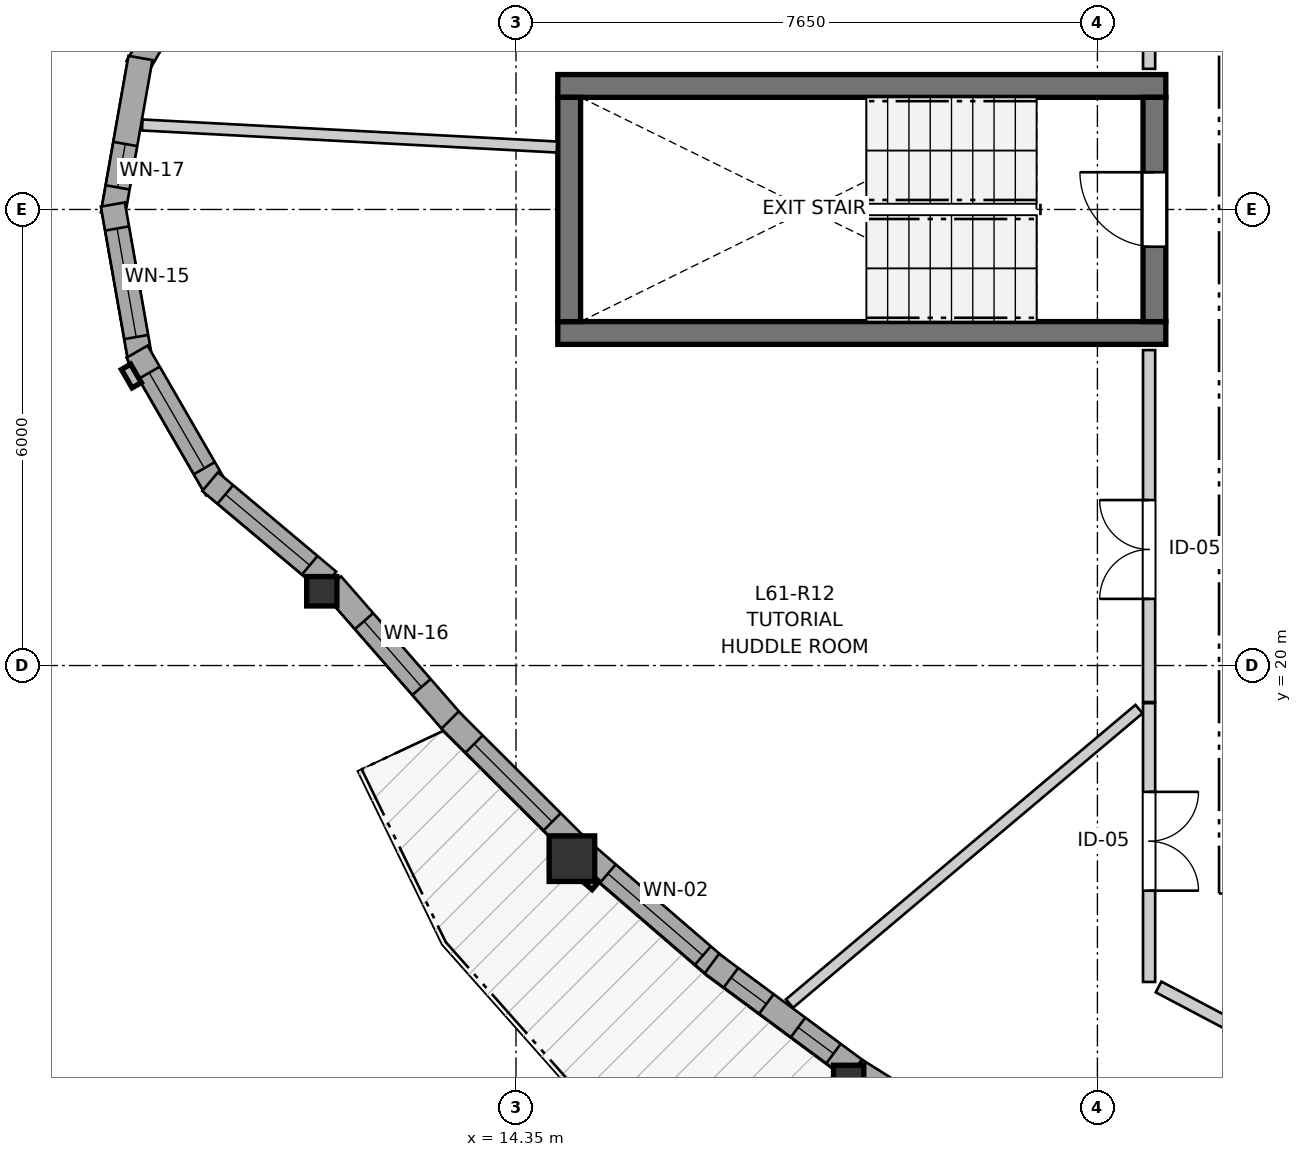
"""IFC4 building model, lengths in metres.
Left out: names, types, materials, properties, quantities, classifications, styles, units other than length and angle.
Written with IfcOpenShell. Run it as: python <this file> out.ifc"""

import sys

from ifc_helpers import new_model, si_unit, direction, frame, frame_2d, origin, origin_2d, place, context, subcontext, project, spatial, rectangle, i_section, extrude, source, transform, mapped, element, fill, save


model = new_model("IFC4")
c1 = context("Model", 3, precision=1e-05, world=origin(), true_north=direction((0.0, 1.0)))
c2 = subcontext(c1, "Body", "Model", "MODEL_VIEW")
j1 = project(units=[si_unit("LENGTHUNIT", "METRE"), si_unit("PLANEANGLEUNIT", "RADIAN")], contexts=[c1])
p1 = place(None, origin())
s1 = spatial("IfcSite", under=j1, at=p1, CompositionType="ELEMENT")
p2 = place(p1, origin())
s2 = spatial("IfcBuilding", under=s1, at=p2, CompositionType="ELEMENT")
p3 = place(p2, frame((0.0, 0.0, 205.2)))
s3 = spatial("IfcBuildingStorey", under=s2, at=p3, CompositionType="ELEMENT", Elevation=205.2)
for number, where, z_axis, x_axis in (
    (1, (14.9, 24.375, 0.0), (0.0, 0.0, 1.0), (1.0, 0.0, 0.0)),
    (2, (22.9, 27.625, 0.0), (0.0, 0.0, 1.0), (-1.0, 0.0, 0.0)),
):
    element("IfcWall", number, at=place(p3, frame(where, z_axis=z_axis, x_axis=x_axis)), inside=s3, PredefinedType="SHEAR", context=c2, shape_type="SweptSolid", body=[
        extrude(rectangle(XDim=8.0, YDim=0.3, at=frame_2d((4.0, 0.0))), origin(), (0.0, 0.0, 1.0), 2.935),
    ])
p4 = place(p3, frame((15.05, 27.475, 0.0), z_axis=(0.0, 0.0, 1.0), x_axis=(0.0, -1.0, 0.0)))
e3 = element("IfcWall", 3, at=p4, inside=s3, PredefinedType="SHEAR", context=c2, shape_type="SweptSolid", body=[
    extrude(rectangle(XDim=2.95, YDim=0.3, at=frame_2d((1.475, 0.0))), origin(), (0.0, 0.0, 1.0), 2.935),
])
p5 = place(p3, frame((22.75, 24.525, 0.0), z_axis=(0.0, 0.0, 1.0), x_axis=(0.0, 1.0, 0.0)))
e4 = element("IfcWall", 4, at=p5, inside=s3, PredefinedType="SHEAR", context=c2, shape_type="SweptSolid", body=[
    extrude(rectangle(XDim=2.95, YDim=0.3, at=frame_2d((1.475, 0.0))), origin(), (0.0, 0.0, 1.0), 2.935),
])
p6 = place(p5, frame((0.985, 0.0, 0.0)))
e5 = element("IfcOpeningElement", 5, at=p6, cuts=e4, PredefinedType="OPENING", context=c2, shape_type="SweptSolid", body=[
    extrude(rectangle(XDim=0.98, YDim=2.15, at=frame_2d((0.49, 1.075))), frame((0.0, 0.16, 0.0), z_axis=(0.0, -1.0, 0.0), x_axis=(1.0, 0.0, 0.0)), (0.0, 0.0, 1.0), 0.32),
])
m1 = source(origin(), c2, "Body", "SweptSolid", [
    extrude(i_section(OverallWidth=0.398, OverallDepth=0.387, WebThickness=0.019, FlangeThickness=0.03, FilletRadius=0.015, at=origin_2d()), origin(), (0.0, 0.0, 1.0), 2.935),
])
p7 = place(p3, frame((11.795, 20.977, 0.0), z_axis=(0.0, 0.0, 1.0), x_axis=(1.0, 0.0, 0.0)))
e6 = element("IfcColumn", 6, at=p7, inside=s3, PredefinedType="PILASTER", context=c2, shape_type="MappedRepresentation", body=[
    mapped(m1, transform((0.0, 0.0, 0.0), x_axis=(1.0, 0.0, 0.0), y_axis=(0.0, 1.0, 0.0), z_axis=(0.0, 0.0, 1.0), scale=1.0)),
])
m2 = source(origin(), c2, "Body", "SweptSolid", [
    extrude(rectangle(XDim=0.6, YDim=0.6, at=origin_2d()), origin(), (0.0, 0.0, 1.0), 2.935),
])
p8 = place(p3, frame((15.086, 17.459, 0.0), z_axis=(0.0, 0.0, 1.0), x_axis=(1.0, 0.0, 0.0)))
e7 = element("IfcColumn", 7, at=p8, inside=s3, PredefinedType="COLUMN", context=c2, shape_type="MappedRepresentation", body=[
    mapped(m2, transform((0.0, 0.0, 0.0), x_axis=(1.0, 0.0, 0.0), y_axis=(0.0, 1.0, 0.0), z_axis=(0.0, 0.0, 1.0), scale=1.0)),
])
p9 = place(p3, frame((18.727, 14.548, 0.0), z_axis=(0.0, 0.0, 1.0), x_axis=(1.0, 0.0, 0.0)))
e8 = element("IfcColumn", 8, at=p9, inside=s3, PredefinedType="PILASTER", context=c2, shape_type="MappedRepresentation", body=[
    mapped(m1, transform((0.0, 0.0, 0.0), x_axis=(1.0, 0.0, 0.0), y_axis=(0.0, 1.0, 0.0), z_axis=(0.0, 0.0, 1.0), scale=1.0)),
])
p10 = place(p3, frame((10.409, 29.681, 0.0), z_axis=(0.0, 0.0, 1.0), x_axis=(-0.49990781971, -0.866078617559, 0.0)))
e9 = element("IfcWall", 9, at=p10, inside=s3, PredefinedType="SOLIDWALL", context=c2, shape_type="SweptSolid", body=[
    extrude(rectangle(XDim=2.09, YDim=0.32, at=frame_2d((1.045, 0.0))), origin(), (0.0, 0.0, 1.0), 2.555),
])
p11 = place(p10, frame((0.42, 0.0, 0.82)))
e10 = element("IfcOpeningElement", 10, at=p11, cuts=e9, PredefinedType="OPENING", context=c2, shape_type="SweptSolid", body=[
    extrude(rectangle(XDim=1.25, YDim=1.35, at=frame_2d((0.625, 0.675))), frame((0.0, 0.17, 0.0), z_axis=(0.0, -1.0, 0.0), x_axis=(1.0, 0.0, 0.0)), (0.0, 0.0, 1.0), 0.34),
])
p12 = place(p3, frame((9.409, 27.993, 0.0), z_axis=(0.0, 0.0, 1.0), x_axis=(-0.173672066494, -0.984803540469, 0.0)))
e11 = element("IfcWall", 11, at=p12, inside=s3, PredefinedType="SOLIDWALL", context=c2, shape_type="SweptSolid", body=[
    extrude(rectangle(XDim=2.09, YDim=0.32, at=frame_2d((1.045, 0.0))), origin(), (0.0, 0.0, 1.0), 2.555),
])
p13 = place(p12, frame((1.149, 0.0, 0.82)))
e12 = element("IfcOpeningElement", 12, at=p13, cuts=e11, PredefinedType="OPENING", context=c2, shape_type="SweptSolid", body=[
    extrude(rectangle(XDim=0.58, YDim=1.35, at=frame_2d((0.29, 0.675))), frame((0.0, 0.17, 0.0), z_axis=(0.0, -1.0, 0.0), x_axis=(1.0, 0.0, 0.0)), (0.0, 0.0, 1.0), 0.34),
])
p14 = place(p3, frame((9.046, 26.065, 0.0), z_axis=(0.0, 0.0, 1.0), x_axis=(0.173672066494, -0.984803540469, 0.0)))
e13 = element("IfcWall", 13, at=p14, inside=s3, PredefinedType="SOLIDWALL", context=c2, shape_type="SweptSolid", body=[
    extrude(rectangle(XDim=2.09, YDim=0.32, at=frame_2d((1.045, 0.0))), origin(), (0.0, 0.0, 1.0), 2.555),
])
p15 = place(p14, frame((0.32, 0.0, 0.82)))
e14 = element("IfcOpeningElement", 14, at=p15, cuts=e13, PredefinedType="OPENING", context=c2, shape_type="SweptSolid", body=[
    extrude(rectangle(XDim=1.45, YDim=1.25, at=frame_2d((0.725, 0.625))), frame((0.0, 0.17, 0.0), z_axis=(0.0, -1.0, 0.0), x_axis=(1.0, 0.0, 0.0)), (0.0, 0.0, 1.0), 0.34),
])
p16 = place(p3, frame((9.365, 24.129, 0.0), z_axis=(0.0, 0.0, 1.0), x_axis=(0.49990781971, -0.866078617559, 0.0)))
e15 = element("IfcWall", 15, at=p16, inside=s3, PredefinedType="SOLIDWALL", context=c2, shape_type="SweptSolid", body=[
    extrude(rectangle(XDim=2.09, YDim=0.32, at=frame_2d((1.045, 0.0))), origin(), (0.0, 0.0, 1.0), 2.555),
])
p17 = place(p16, frame((0.32, 0.0, 0.82)))
e16 = element("IfcOpeningElement", 16, at=p17, cuts=e15, PredefinedType="OPENING", context=c2, shape_type="SweptSolid", body=[
    extrude(rectangle(XDim=1.45, YDim=1.25, at=frame_2d((0.725, 0.625))), frame((0.0, 0.17, 0.0), z_axis=(0.0, -1.0, 0.0), x_axis=(1.0, 0.0, 0.0)), (0.0, 0.0, 1.0), 0.34),
])
p18 = place(p3, frame((10.326, 22.419, 0.0), z_axis=(0.0, 0.0, 1.0), x_axis=(0.766099948115, -0.642721455608, 0.0)))
e17 = element("IfcWall", 17, at=p18, inside=s3, PredefinedType="SOLIDWALL", context=c2, shape_type="SweptSolid", body=[
    extrude(rectangle(XDim=2.032, YDim=0.32, at=frame_2d((1.016, 0.0))), origin(), (0.0, 0.0, 1.0), 2.555),
])
p19 = place(p18, frame((0.261, 0.0, 0.82)))
e18 = element("IfcOpeningElement", 18, at=p19, cuts=e17, PredefinedType="OPENING", context=c2, shape_type="SweptSolid", body=[
    extrude(rectangle(XDim=1.45, YDim=1.25, at=frame_2d((0.725, 0.625))), frame((0.0, 0.17, 0.0), z_axis=(0.0, -1.0, 0.0), x_axis=(1.0, 0.0, 0.0)), (0.0, 0.0, 1.0), 0.34),
])
p20 = place(p3, frame((11.929, 21.067, 0.0), z_axis=(0.0, 0.0, 1.0), x_axis=(0.657623588515, -0.753346677054, 0.0)))
e19 = element("IfcWall", 19, at=p20, inside=s3, PredefinedType="SOLIDWALL", context=c2, shape_type="SweptSolid", body=[
    extrude(rectangle(XDim=2.454, YDim=0.32, at=frame_2d((1.227, 0.0))), origin(), (0.0, 0.0, 1.0), 2.555),
])
p21 = place(p20, frame((0.642, 0.0, 0.82)))
e20 = element("IfcOpeningElement", 20, at=p21, cuts=e19, PredefinedType="OPENING", context=c2, shape_type="SweptSolid", body=[
    extrude(rectangle(XDim=1.15, YDim=1.2, at=frame_2d((0.575, 0.6))), frame((0.0, 0.17, 0.0), z_axis=(0.0, -1.0, 0.0), x_axis=(1.0, 0.0, 0.0)), (0.0, 0.0, 1.0), 0.34),
])
p22 = place(p3, frame((13.483, 19.282, 0.0), z_axis=(0.0, 0.0, 1.0), x_axis=(0.7083616261, -0.70584970544, 0.0)))
e21 = element("IfcWall", 21, at=p22, inside=s3, PredefinedType="SOLIDWALL", context=c2, shape_type="SweptSolid", body=[
    extrude(rectangle(XDim=2.333, YDim=0.32, at=frame_2d((1.166, 0.0))), origin(), (0.0, 0.0, 1.0), 2.555),
])
p23 = place(p22, frame((0.446, 0.0, 0.82)))
e22 = element("IfcOpeningElement", 22, at=p23, cuts=e21, PredefinedType="OPENING", context=c2, shape_type="SweptSolid", body=[
    extrude(rectangle(XDim=1.45, YDim=1.25, at=frame_2d((0.725, 0.625))), frame((0.0, 0.17, 0.0), z_axis=(0.0, -1.0, 0.0), x_axis=(1.0, 0.0, 0.0)), (0.0, 0.0, 1.0), 0.34),
])
p24 = place(p3, frame((15.259, 17.521, 0.0), z_axis=(0.0, 0.0, 1.0), x_axis=(0.757533377792, -0.652796431923, 0.0)))
e23 = element("IfcWall", 23, at=p24, inside=s3, PredefinedType="SOLIDWALL", context=c2, shape_type="SweptSolid", body=[
    extrude(rectangle(XDim=2.294, YDim=0.32, at=frame_2d((1.147, 0.0))), origin(), (0.0, 0.0, 1.0), 2.555),
])
p25 = place(p24, frame((0.397, 0.0, 0.82)))
e24 = element("IfcOpeningElement", 24, at=p25, cuts=e23, PredefinedType="OPENING", context=c2, shape_type="SweptSolid", body=[
    extrude(rectangle(XDim=1.65, YDim=1.45, at=frame_2d((0.825, 0.725))), frame((0.0, 0.17, 0.0), z_axis=(0.0, -1.0, 0.0), x_axis=(1.0, 0.0, 0.0)), (0.0, 0.0, 1.0), 0.34),
])
p26 = place(p3, frame((16.927, 16.079, 0.0), z_axis=(0.0, 0.0, 1.0), x_axis=(0.803843896942, -0.594840305754, 0.0)))
e25 = element("IfcWall", 25, at=p26, inside=s3, PredefinedType="SOLIDWALL", context=c2, shape_type="SweptSolid", body=[
    extrude(rectangle(XDim=2.337, YDim=0.32, at=frame_2d((1.169, 0.0))), origin(), (0.0, 0.0, 1.0), 2.555),
])
p27 = place(p26, frame((0.312, 0.0, 0.82)))
e26 = element("IfcOpeningElement", 26, at=p27, cuts=e25, PredefinedType="OPENING", context=c2, shape_type="SweptSolid", body=[
    extrude(rectangle(XDim=0.58, YDim=1.35, at=frame_2d((0.29, 0.675))), frame((0.0, 0.17, 0.0), z_axis=(0.0, -1.0, 0.0), x_axis=(1.0, 0.0, 0.0)), (0.0, 0.0, 1.0), 0.34),
])
p28 = place(p26, frame((1.411, 0.0, 0.82)))
e27 = element("IfcOpeningElement", 27, at=p28, cuts=e25, PredefinedType="OPENING", context=c2, shape_type="SweptSolid", body=[
    extrude(rectangle(XDim=0.58, YDim=1.35, at=frame_2d((0.29, 0.675))), frame((0.0, 0.17, 0.0), z_axis=(0.0, -1.0, 0.0), x_axis=(1.0, 0.0, 0.0)), (0.0, 0.0, 1.0), 0.34),
])
p29 = place(p3, frame((18.829, 14.673, 0.0), z_axis=(0.0, 0.0, 1.0), x_axis=(0.846418748285, -0.53251788942, 0.0)))
e28 = element("IfcWall", 28, at=p29, inside=s3, PredefinedType="SOLIDWALL", context=c2, shape_type="SweptSolid", body=[
    extrude(rectangle(XDim=2.324, YDim=0.32, at=frame_2d((1.162, 0.0))), origin(), (0.0, 0.0, 1.0), 2.555),
])
p30 = place(p29, frame((0.477, 0.0, 0.82)))
e29 = element("IfcOpeningElement", 29, at=p30, cuts=e28, PredefinedType="OPENING", context=c2, shape_type="SweptSolid", body=[
    extrude(rectangle(XDim=1.35, YDim=1.45, at=frame_2d((0.675, 0.725))), frame((0.0, 0.17, 0.0), z_axis=(0.0, -1.0, 0.0), x_axis=(1.0, 0.0, 0.0)), (0.0, 0.0, 1.0), 0.34),
])
p31 = place(p3, frame((22.68, 19.52, 0.0), z_axis=(0.0, 0.0, 1.0), x_axis=(0.0, 1.0, 0.0)))
e30 = element("IfcWall", 30, at=p31, inside=s3, PredefinedType="PARTITIONING", context=c2, shape_type="SweptSolid", body=[
    extrude(rectangle(XDim=4.63, YDim=0.16, at=frame_2d((2.315, 0.0))), origin(), (0.0, 0.0, 1.0), 2.935),
])
p32 = place(p31, frame((1.357, 0.0, 0.0)))
e31 = element("IfcOpeningElement", 31, at=p32, cuts=e30, PredefinedType="OPENING", context=c2, shape_type="SweptSolid", body=[
    extrude(rectangle(XDim=1.3, YDim=2.1, at=frame_2d((0.65, 1.05))), frame((0.0, 0.09, 0.0), z_axis=(0.0, -1.0, 0.0), x_axis=(1.0, 0.0, 0.0)), (0.0, 0.0, 1.0), 0.18),
])
p33 = place(p3, frame((22.68, 19.505, 0.0), z_axis=(0.0, 0.0, 1.0), x_axis=(0.0, -1.0, 0.0)))
e32 = element("IfcWall", 32, at=p33, inside=s3, PredefinedType="PARTITIONING", context=c2, shape_type="SweptSolid", body=[
    extrude(rectangle(XDim=3.668, YDim=0.16, at=frame_2d((1.834, 0.0))), origin(), (0.0, 0.0, 1.0), 2.935),
])
p34 = place(p33, frame((1.167, 0.0, 0.0)))
e33 = element("IfcOpeningElement", 33, at=p34, cuts=e32, PredefinedType="OPENING", context=c2, shape_type="SweptSolid", body=[
    extrude(rectangle(XDim=1.3, YDim=2.1, at=frame_2d((0.65, 1.05))), frame((0.0, 0.09, 0.0), z_axis=(0.0, -1.0, 0.0), x_axis=(1.0, 0.0, 0.0)), (0.0, 0.0, 1.0), 0.18),
])
p35 = place(p3, frame((22.68, 27.85, 0.0), z_axis=(0.0, 0.0, 1.0), x_axis=(0.0, 1.0, 0.0)))
e34 = element("IfcWall", 34, at=p35, inside=s3, PredefinedType="PARTITIONING", context=c2, shape_type="SweptSolid", body=[
    extrude(rectangle(XDim=1.929, YDim=0.16, at=frame_2d((0.964, 0.0))), origin(), (0.0, 0.0, 1.0), 2.935),
])
p36 = place(p35, frame((0.53, 0.0, 0.0)))
e35 = element("IfcOpeningElement", 35, at=p36, cuts=e34, PredefinedType="OPENING", context=c2, shape_type="SweptSolid", body=[
    extrude(rectangle(XDim=0.96, YDim=2.1, at=frame_2d((0.48, 1.05))), frame((0.0, 0.09, 0.0), z_axis=(0.0, -1.0, 0.0), x_axis=(1.0, 0.0, 0.0)), (0.0, 0.0, 1.0), 0.18),
])
p37 = place(p3, frame((17.948, 15.553, 0.0), z_axis=(0.0, 0.0, 1.0), x_axis=(0.764805901006, 0.644260765364, 0.0)))
e36 = element("IfcWall", 36, at=p37, inside=s3, PredefinedType="PARTITIONING", context=c2, shape_type="SweptSolid", body=[
    extrude(rectangle(XDim=6.013, YDim=0.145, at=frame_2d((3.007, 0.0))), origin(), (0.0, 0.0, 1.0), 2.935),
])
p38 = place(p3, frame((9.433, 27.112, 0.0), z_axis=(0.0, 0.0, 1.0), x_axis=(0.998589537807, -0.053093643525, 0.0)))
e37 = element("IfcWall", 37, at=p38, inside=s3, PredefinedType="PARTITIONING", context=c2, shape_type="SweptSolid", body=[
    extrude(rectangle(XDim=5.463, YDim=0.145, at=frame_2d((2.731, 0.0))), origin(), (0.0, 0.0, 1.0), 2.935),
])
p39 = place(p3, frame((22.804, 15.771, 0.0), z_axis=(0.0, 0.0, 1.0), x_axis=(0.884421402819, -0.4666891709, 0.0)))
e38 = element("IfcWall", 38, at=p39, inside=s3, PredefinedType="PARTITIONING", context=c2, shape_type="SweptSolid", body=[
    extrude(rectangle(XDim=1.451, YDim=0.16, at=frame_2d((0.726, 0.0))), origin(), (0.0, 0.0, 1.0), 2.935),
])
m3 = source(origin(), c2, "Body", "SweptSolid", [
    extrude(rectangle(XDim=0.58, YDim=1.35, at=frame_2d((0.29, 0.675))), frame((0.0, 0.03, 0.0), z_axis=(0.0, -1.0, 0.0), x_axis=(1.0, 0.0, 0.0)), (0.0, 0.0, 1.0), 0.06),
])
p40 = place(p13, origin())
e39 = element("IfcWindow", 39, at=p40, inside=s3, PartitioningType="SINGLE_PANEL", PredefinedType="WINDOW", context=c2, shape_type="MappedRepresentation", body=[
    mapped(m3, transform((0.0, 0.0, 0.0), x_axis=(1.0, 0.0, 0.0), y_axis=(0.0, 1.0, 0.0), z_axis=(0.0, 0.0, 1.0), scale=1.0)),
])
fill(e12, e39)
m4 = source(origin(), c2, "Body", "SweptSolid", [
    extrude(rectangle(XDim=1.45, YDim=1.25, at=frame_2d((0.725, 0.625))), frame((0.0, 0.03, 0.0), z_axis=(0.0, -1.0, 0.0), x_axis=(1.0, 0.0, 0.0)), (0.0, 0.0, 1.0), 0.06),
])
p41 = place(p15, origin())
e40 = element("IfcWindow", 40, at=p41, inside=s3, PartitioningType="SINGLE_PANEL", PredefinedType="WINDOW", context=c2, shape_type="MappedRepresentation", body=[
    mapped(m4, transform((0.0, 0.0, 0.0), x_axis=(1.0, 0.0, 0.0), y_axis=(0.0, 1.0, 0.0), z_axis=(0.0, 0.0, 1.0), scale=1.0)),
])
fill(e14, e40)
p42 = place(p17, origin())
e41 = element("IfcWindow", 41, at=p42, inside=s3, PartitioningType="SINGLE_PANEL", PredefinedType="WINDOW", context=c2, shape_type="MappedRepresentation", body=[
    mapped(m4, transform((0.0, 0.0, 0.0), x_axis=(1.0, 0.0, 0.0), y_axis=(0.0, 1.0, 0.0), z_axis=(0.0, 0.0, 1.0), scale=1.0)),
])
fill(e16, e41)
p43 = place(p19, origin())
e42 = element("IfcWindow", 42, at=p43, inside=s3, PartitioningType="SINGLE_PANEL", PredefinedType="WINDOW", context=c2, shape_type="MappedRepresentation", body=[
    mapped(m4, transform((0.0, 0.0, 0.0), x_axis=(1.0, 0.0, 0.0), y_axis=(0.0, 1.0, 0.0), z_axis=(0.0, 0.0, 1.0), scale=1.0)),
])
fill(e18, e42)
m5 = source(origin(), c2, "Body", "SweptSolid", [
    extrude(rectangle(XDim=1.15, YDim=1.2, at=frame_2d((0.575, 0.6))), frame((0.0, 0.03, 0.0), z_axis=(0.0, -1.0, 0.0), x_axis=(1.0, 0.0, 0.0)), (0.0, 0.0, 1.0), 0.06),
])
p44 = place(p21, origin())
e43 = element("IfcWindow", 43, at=p44, inside=s3, PartitioningType="SINGLE_PANEL", PredefinedType="WINDOW", context=c2, shape_type="MappedRepresentation", body=[
    mapped(m5, transform((0.0, 0.0, 0.0), x_axis=(1.0, 0.0, 0.0), y_axis=(0.0, 1.0, 0.0), z_axis=(0.0, 0.0, 1.0), scale=1.0)),
])
fill(e20, e43)
p45 = place(p23, origin())
e44 = element("IfcWindow", 44, at=p45, inside=s3, PartitioningType="SINGLE_PANEL", PredefinedType="WINDOW", context=c2, shape_type="MappedRepresentation", body=[
    mapped(m4, transform((0.0, 0.0, 0.0), x_axis=(1.0, 0.0, 0.0), y_axis=(0.0, 1.0, 0.0), z_axis=(0.0, 0.0, 1.0), scale=1.0)),
])
fill(e22, e44)
m6 = source(origin(), c2, "Body", "SweptSolid", [
    extrude(rectangle(XDim=1.65, YDim=1.45, at=frame_2d((0.825, 0.725))), frame((0.0, 0.03, 0.0), z_axis=(0.0, -1.0, 0.0), x_axis=(1.0, 0.0, 0.0)), (0.0, 0.0, 1.0), 0.06),
])
p46 = place(p25, origin())
e45 = element("IfcWindow", 45, at=p46, inside=s3, PartitioningType="SINGLE_PANEL", PredefinedType="WINDOW", context=c2, shape_type="MappedRepresentation", body=[
    mapped(m6, transform((0.0, 0.0, 0.0), x_axis=(1.0, 0.0, 0.0), y_axis=(0.0, 1.0, 0.0), z_axis=(0.0, 0.0, 1.0), scale=1.0)),
])
fill(e24, e45)
p47 = place(p27, origin())
e46 = element("IfcWindow", 46, at=p47, inside=s3, PartitioningType="SINGLE_PANEL", PredefinedType="WINDOW", context=c2, shape_type="MappedRepresentation", body=[
    mapped(m3, transform((0.0, 0.0, 0.0), x_axis=(1.0, 0.0, 0.0), y_axis=(0.0, 1.0, 0.0), z_axis=(0.0, 0.0, 1.0), scale=1.0)),
])
fill(e26, e46)
p48 = place(p28, origin())
e47 = element("IfcWindow", 47, at=p48, inside=s3, PartitioningType="SINGLE_PANEL", PredefinedType="WINDOW", context=c2, shape_type="MappedRepresentation", body=[
    mapped(m3, transform((0.0, 0.0, 0.0), x_axis=(1.0, 0.0, 0.0), y_axis=(0.0, 1.0, 0.0), z_axis=(0.0, 0.0, 1.0), scale=1.0)),
])
fill(e27, e47)
m7 = source(origin(), c2, "Body", "SweptSolid", [
    extrude(rectangle(XDim=0.98, YDim=2.15, at=frame_2d((0.49, 1.075))), frame((0.0, 0.025, 0.0), z_axis=(0.0, -1.0, 0.0), x_axis=(1.0, 0.0, 0.0)), (0.0, 0.0, 1.0), 0.05),
])
p49 = place(p6, origin())
e48 = element("IfcDoor", 48, at=p49, inside=s3, OperationType="SINGLE_SWING_RIGHT", PredefinedType="DOOR", context=c2, shape_type="MappedRepresentation", body=[
    mapped(m7, transform((0.0, 0.0, 0.0), x_axis=(1.0, 0.0, 0.0), y_axis=(0.0, 1.0, 0.0), z_axis=(0.0, 0.0, 1.0), scale=1.0)),
])
fill(e5, e48)
m8 = source(origin(), c2, "Body", "SweptSolid", [
    extrude(rectangle(XDim=1.3, YDim=2.1, at=frame_2d((0.65, 1.05))), frame((0.0, 0.025, 0.0), z_axis=(0.0, -1.0, 0.0), x_axis=(1.0, 0.0, 0.0)), (0.0, 0.0, 1.0), 0.05),
])
p50 = place(p32, origin())
e49 = element("IfcDoor", 49, at=p50, inside=s3, OperationType="DOUBLE_DOOR_SINGLE_SWING", PredefinedType="DOOR", context=c2, shape_type="MappedRepresentation", body=[
    mapped(m8, transform((0.0, 0.0, 0.0), x_axis=(1.0, 0.0, 0.0), y_axis=(0.0, 1.0, 0.0), z_axis=(0.0, 0.0, 1.0), scale=1.0)),
])
fill(e31, e49)
p51 = place(p34, origin())
e50 = element("IfcDoor", 50, at=p51, inside=s3, OperationType="DOUBLE_DOOR_SINGLE_SWING", PredefinedType="DOOR", context=c2, shape_type="MappedRepresentation", body=[
    mapped(m8, transform((0.0, 0.0, 0.0), x_axis=(1.0, 0.0, 0.0), y_axis=(0.0, 1.0, 0.0), z_axis=(0.0, 0.0, 1.0), scale=1.0)),
])
fill(e33, e50)
save(model, sys.argv[1])
